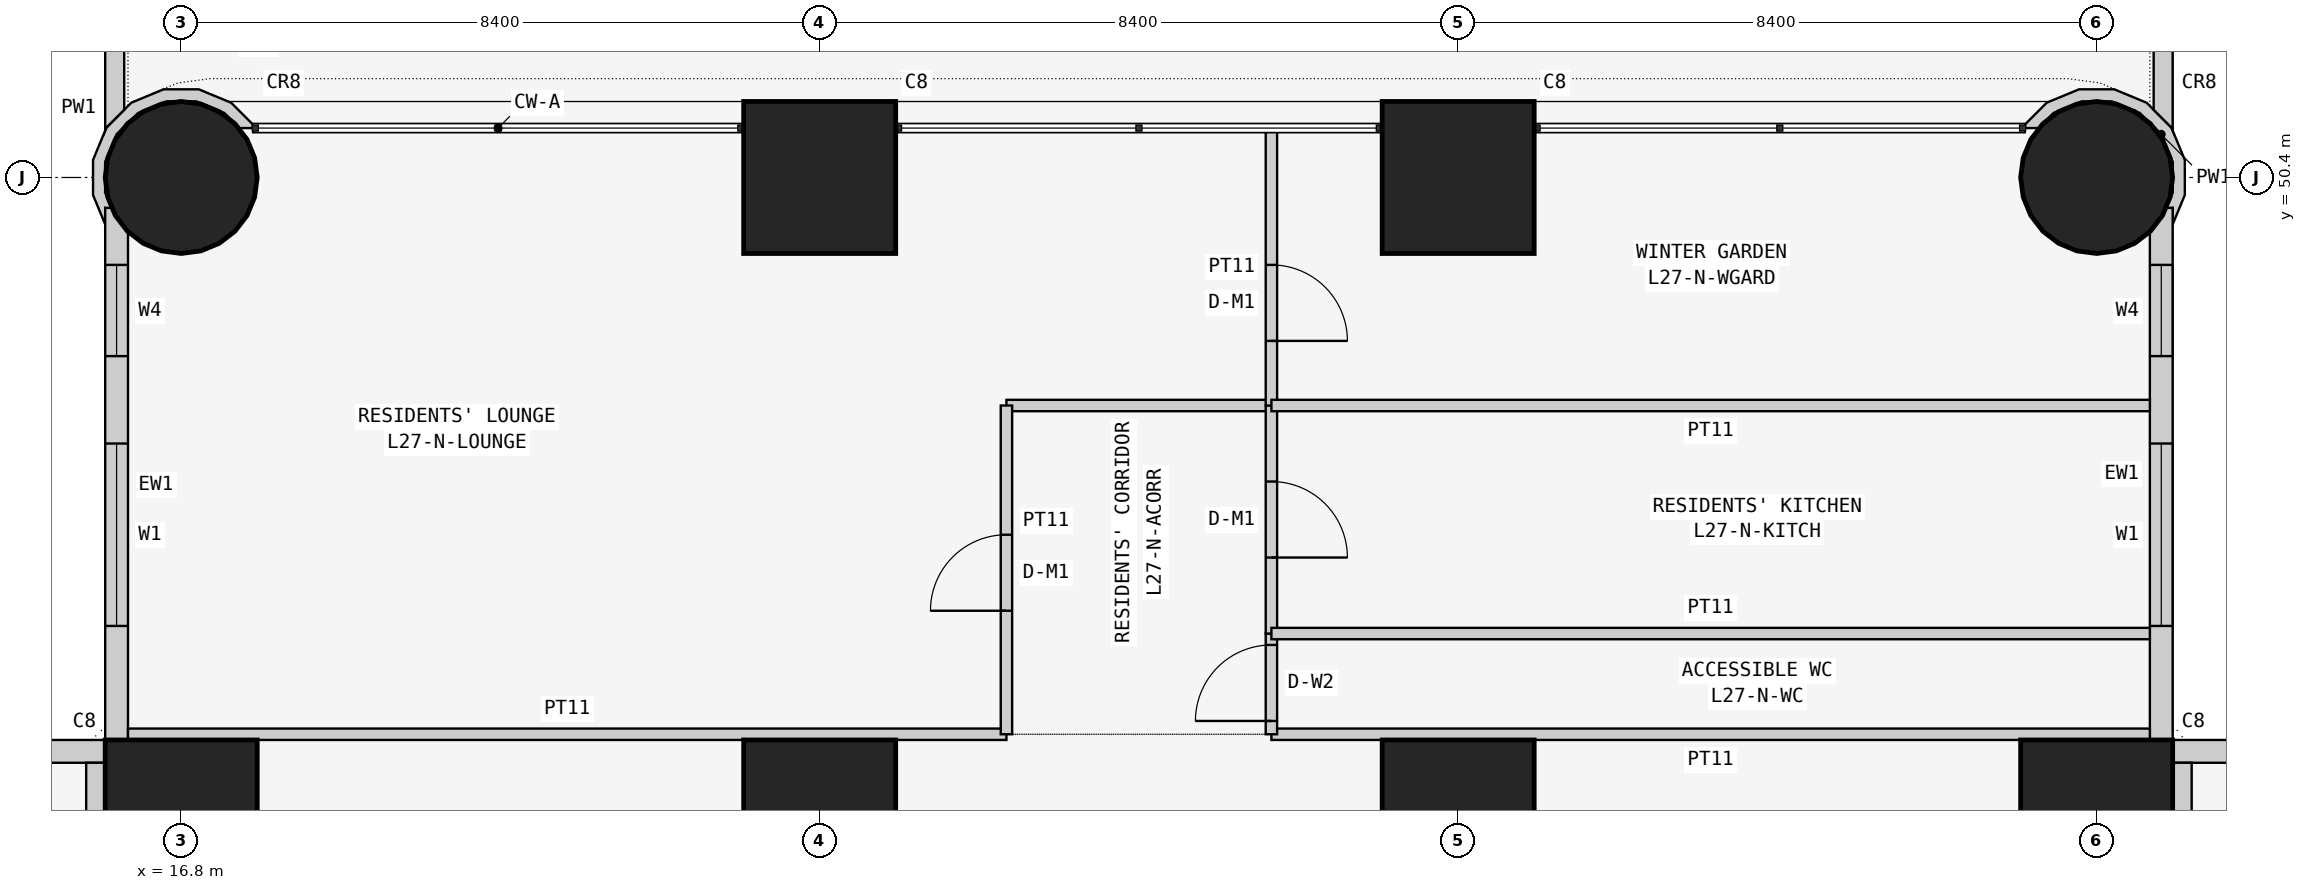
"""IFC4 building model, lengths in metres.
Left out: names, types, materials, properties, quantities, classifications, styles, units other than length and angle.
Written with IfcOpenShell. Run it as: python <this file> out.ifc"""

import sys

from ifc_helpers import new_model, si_unit, direction, frame, frame_2d, origin, origin_2d, place, context, subcontext, project, spatial, polyline, rectangle, circle, outline, extrude, element, fill, save


model = new_model("IFC4")
c1 = context("Model", 3, precision=1e-05, world=origin(), true_north=direction((0.0, 1.0)))
c2 = subcontext(c1, "Body", "Model", "MODEL_VIEW")
j1 = project(units=[si_unit("LENGTHUNIT", "METRE"), si_unit("PLANEANGLEUNIT", "RADIAN")], contexts=[c1])
p1 = place(None, origin())
s1 = spatial("IfcSite", under=j1, at=p1, CompositionType="ELEMENT")
p2 = place(p1, origin())
s2 = spatial("IfcBuilding", under=s1, at=p2, CompositionType="ELEMENT")
p3 = place(p2, frame((0.0, 0.0, 108.9)))
s3 = spatial("IfcBuildingStorey", under=s2, at=p3, CompositionType="ELEMENT", Elevation=108.9)
p4 = place(p3, frame((16.8, 42.0, 0.0), z_axis=(0.0, 0.0, 1.0), x_axis=(1.0, 0.0, 0.0)))
e1 = element("IfcColumn", 1, at=p4, inside=s3, PredefinedType="COLUMN", context=c2, shape_type="SweptSolid", body=[
    extrude(rectangle(XDim=2.0, YDim=2.0, at=origin_2d()), origin(), (0.0, 0.0, 1.0), 3.6),
])
p5 = place(p3, frame((16.8, 50.4, 0.0), z_axis=(0.0, 0.0, 1.0), x_axis=(1.0, 0.0, 0.0)))
e2 = element("IfcColumn", 2, at=p5, inside=s3, PredefinedType="COLUMN", context=c2, shape_type="SweptSolid", body=[
    extrude(circle(Radius=1.0, at=origin_2d()), origin(), (0.0, 0.0, 1.0), 3.6),
])
for number, where, z_axis, x_axis in (
    (3, (25.2, 42.0, 0.0), (0.0, 0.0, 1.0), (1.0, 0.0, 0.0)),
    (4, (25.2, 50.4, 0.0), (0.0, 0.0, 1.0), (1.0, 0.0, 0.0)),
    (5, (33.6, 42.0, 0.0), (0.0, 0.0, 1.0), (1.0, 0.0, 0.0)),
    (6, (33.6, 50.4, 0.0), (0.0, 0.0, 1.0), (1.0, 0.0, 0.0)),
    (7, (42.0, 42.0, 0.0), (0.0, 0.0, 1.0), (1.0, 0.0, 0.0)),
):
    element("IfcColumn", number, at=place(p3, frame(where, z_axis=z_axis, x_axis=x_axis)), inside=s3, PredefinedType="COLUMN", context=c2, shape_type="SweptSolid", body=[
        extrude(rectangle(XDim=2.0, YDim=2.0, at=origin_2d()), origin(), (0.0, 0.0, 1.0), 3.6),
    ])
p6 = place(p3, frame((42.0, 50.4, 0.0), z_axis=(0.0, 0.0, 1.0), x_axis=(1.0, 0.0, 0.0)))
e8 = element("IfcColumn", 8, at=p6, inside=s3, PredefinedType="COLUMN", context=c2, shape_type="SweptSolid", body=[
    extrude(circle(Radius=1.0, at=origin_2d()), origin(), (0.0, 0.0, 1.0), 3.6),
])
p7 = place(p3, frame((15.8, 42.85, 0.0), z_axis=(0.0, 0.0, 1.0), x_axis=(-1.0, 0.0, 0.0)))
e9 = element("IfcWall", 9, at=p7, inside=s3, PredefinedType="SOLIDWALL", context=c2, shape_type="SweptSolid", body=[
    extrude(rectangle(XDim=15.4, YDim=0.3, at=frame_2d((7.7, 0.0))), origin(), (0.0, 0.0, 1.0), 3.45),
])
p8 = place(p7, frame((1.2, 0.0, 0.9)))
e10 = element("IfcOpeningElement", 10, at=p8, cuts=e9, PredefinedType="OPENING", context=c2, shape_type="SweptSolid", body=[
    extrude(rectangle(XDim=1.8, YDim=1.5, at=frame_2d((0.9, 0.75))), frame((0.0, 0.16, 0.0), z_axis=(0.0, -1.0, 0.0), x_axis=(1.0, 0.0, 0.0)), (0.0, 0.0, 1.0), 0.32),
])
p9 = place(p7, frame((4.95, 0.0, 1.5)))
e11 = element("IfcOpeningElement", 11, at=p9, cuts=e9, PredefinedType="OPENING", context=c2, shape_type="SweptSolid", body=[
    extrude(rectangle(XDim=0.9, YDim=0.7, at=frame_2d((0.45, 0.35))), frame((0.0, 0.16, 0.0), z_axis=(0.0, -1.0, 0.0), x_axis=(1.0, 0.0, 0.0)), (0.0, 0.0, 1.0), 0.32),
])
p10 = place(p7, frame((8.5, 0.0, 0.9)))
e12 = element("IfcOpeningElement", 12, at=p10, cuts=e9, PredefinedType="OPENING", context=c2, shape_type="SweptSolid", body=[
    extrude(rectangle(XDim=1.8, YDim=1.5, at=frame_2d((0.9, 0.75))), frame((0.0, 0.16, 0.0), z_axis=(0.0, -1.0, 0.0), x_axis=(1.0, 0.0, 0.0)), (0.0, 0.0, 1.0), 0.32),
])
p11 = place(p7, frame((12.5, 0.0, 0.0)))
e13 = element("IfcOpeningElement", 13, at=p11, cuts=e9, PredefinedType="OPENING", context=c2, shape_type="SweptSolid", body=[
    extrude(rectangle(XDim=0.9, YDim=2.4, at=frame_2d((0.45, 1.2))), frame((0.0, 0.16, 0.0), z_axis=(0.0, -1.0, 0.0), x_axis=(1.0, 0.0, 0.0)), (0.0, 0.0, 1.0), 0.32),
])
p12 = place(p7, frame((13.5, 0.0, 0.9)))
e14 = element("IfcOpeningElement", 14, at=p12, cuts=e9, PredefinedType="OPENING", context=c2, shape_type="SweptSolid", body=[
    extrude(rectangle(XDim=1.2, YDim=1.5, at=frame_2d((0.6, 0.75))), frame((0.0, 0.16, 0.0), z_axis=(0.0, -1.0, 0.0), x_axis=(1.0, 0.0, 0.0)), (0.0, 0.0, 1.0), 0.32),
])
p13 = place(p3, frame((58.4, 42.85, 0.0), z_axis=(0.0, 0.0, 1.0), x_axis=(-1.0, 0.0, 0.0)))
e15 = element("IfcWall", 15, at=p13, inside=s3, PredefinedType="SOLIDWALL", context=c2, shape_type="SweptSolid", body=[
    extrude(rectangle(XDim=15.7, YDim=0.3, at=frame_2d((7.85, 0.0))), origin(), (0.0, 0.0, 1.0), 3.45),
])
p14 = place(p13, frame((12.4, 0.0, 0.9)))
e16 = element("IfcOpeningElement", 16, at=p14, cuts=e15, PredefinedType="OPENING", context=c2, shape_type="SweptSolid", body=[
    extrude(rectangle(XDim=1.8, YDim=1.5, at=frame_2d((0.9, 0.75))), frame((0.0, 0.16, 0.0), z_axis=(0.0, -1.0, 0.0), x_axis=(1.0, 0.0, 0.0)), (0.0, 0.0, 1.0), 0.32),
])
p15 = place(p13, frame((9.55, 0.0, 1.5)))
e17 = element("IfcOpeningElement", 17, at=p15, cuts=e15, PredefinedType="OPENING", context=c2, shape_type="SweptSolid", body=[
    extrude(rectangle(XDim=0.9, YDim=0.7, at=frame_2d((0.45, 0.35))), frame((0.0, 0.16, 0.0), z_axis=(0.0, -1.0, 0.0), x_axis=(1.0, 0.0, 0.0)), (0.0, 0.0, 1.0), 0.32),
])
p16 = place(p13, frame((5.1, 0.0, 0.9)))
e18 = element("IfcOpeningElement", 18, at=p16, cuts=e15, PredefinedType="OPENING", context=c2, shape_type="SweptSolid", body=[
    extrude(rectangle(XDim=1.8, YDim=1.5, at=frame_2d((0.9, 0.75))), frame((0.0, 0.16, 0.0), z_axis=(0.0, -1.0, 0.0), x_axis=(1.0, 0.0, 0.0)), (0.0, 0.0, 1.0), 0.32),
])
p17 = place(p13, frame((2.0, 0.0, 0.0)))
e19 = element("IfcOpeningElement", 19, at=p17, cuts=e15, PredefinedType="OPENING", context=c2, shape_type="SweptSolid", body=[
    extrude(rectangle(XDim=0.9, YDim=2.4, at=frame_2d((0.45, 1.2))), frame((0.0, 0.16, 0.0), z_axis=(0.0, -1.0, 0.0), x_axis=(1.0, 0.0, 0.0)), (0.0, 0.0, 1.0), 0.32),
])
p18 = place(p13, frame((0.7, 0.0, 0.9)))
e20 = element("IfcOpeningElement", 20, at=p18, cuts=e15, PredefinedType="OPENING", context=c2, shape_type="SweptSolid", body=[
    extrude(rectangle(XDim=1.2, YDim=1.5, at=frame_2d((0.6, 0.75))), frame((0.0, 0.16, 0.0), z_axis=(0.0, -1.0, 0.0), x_axis=(1.0, 0.0, 0.0)), (0.0, 0.0, 1.0), 0.32),
])
p19 = place(p3, frame((42.85, 43.0, 0.0), z_axis=(0.0, 0.0, 1.0), x_axis=(0.0, 1.0, 0.0)))
e21 = element("IfcWall", 21, at=p19, inside=s3, PredefinedType="SOLIDWALL", context=c2, shape_type="SweptSolid", body=[
    extrude(rectangle(XDim=7.0, YDim=0.3, at=frame_2d((3.5, 0.0))), origin(), (0.0, 0.0, 1.0), 3.45),
])
p20 = place(p19, frame((1.5, 0.0, 0.9)))
e22 = element("IfcOpeningElement", 22, at=p20, cuts=e21, PredefinedType="OPENING", context=c2, shape_type="SweptSolid", body=[
    extrude(rectangle(XDim=2.4, YDim=1.5, at=frame_2d((1.2, 0.75))), frame((0.0, 0.16, 0.0), z_axis=(0.0, -1.0, 0.0), x_axis=(1.0, 0.0, 0.0)), (0.0, 0.0, 1.0), 0.32),
])
p21 = place(p19, frame((5.05, 0.0, 0.9)))
e23 = element("IfcOpeningElement", 23, at=p21, cuts=e21, PredefinedType="OPENING", context=c2, shape_type="SweptSolid", body=[
    extrude(rectangle(XDim=1.2, YDim=1.5, at=frame_2d((0.6, 0.75))), frame((0.0, 0.16, 0.0), z_axis=(0.0, -1.0, 0.0), x_axis=(1.0, 0.0, 0.0)), (0.0, 0.0, 1.0), 0.32),
])
p22 = place(p3, frame((15.95, 50.0, 0.0), z_axis=(0.0, 0.0, 1.0), x_axis=(0.0, -1.0, 0.0)))
e24 = element("IfcWall", 24, at=p22, inside=s3, PredefinedType="SOLIDWALL", context=c2, shape_type="SweptSolid", body=[
    extrude(rectangle(XDim=7.3, YDim=0.3, at=frame_2d((3.65, 0.0))), origin(), (0.0, 0.0, 1.0), 3.45),
])
p23 = place(p22, frame((3.1, 0.0, 0.9)))
e25 = element("IfcOpeningElement", 25, at=p23, cuts=e24, PredefinedType="OPENING", context=c2, shape_type="SweptSolid", body=[
    extrude(rectangle(XDim=2.4, YDim=1.5, at=frame_2d((1.2, 0.75))), frame((0.0, 0.16, 0.0), z_axis=(0.0, -1.0, 0.0), x_axis=(1.0, 0.0, 0.0)), (0.0, 0.0, 1.0), 0.32),
])
p24 = place(p22, frame((0.75, 0.0, 0.9)))
e26 = element("IfcOpeningElement", 26, at=p24, cuts=e24, PredefinedType="OPENING", context=c2, shape_type="SweptSolid", body=[
    extrude(rectangle(XDim=1.2, YDim=1.5, at=frame_2d((0.6, 0.75))), frame((0.0, 0.16, 0.0), z_axis=(0.0, -1.0, 0.0), x_axis=(1.0, 0.0, 0.0)), (0.0, 0.0, 1.0), 0.32),
])
p25 = place(p3, frame((42.919, 49.833, 0.0), z_axis=(0.0, 0.0, 1.0), x_axis=(0.555974394895, 0.831199417842, 0.0)))
e27 = element("IfcWall", 27, at=p25, inside=s3, PredefinedType="SOLIDWALL", context=c2, shape_type="SweptSolid", body=[
    extrude(outline(polyline([(0.413, -0.013), (0.797, 0.243), (1.053, 0.627), (1.143, 1.08), (1.053, 1.532), (0.796, 1.916), (0.412, 2.172), (0.017, 2.25), (-0.023, 2.224), (0.075, 2.077), (0.35, 2.022), (0.682, 1.801), (0.903, 1.47), (0.981, 1.08), (0.904, 0.689), (0.682, 0.358), (0.351, 0.137), (0.126, 0.092), (0.184, 0.026), (0.003, -0.095), (0.413, -0.013)])), origin(), (0.0, 0.0, 1.0), 3.45),
])
p26 = place(p3, frame((17.668, 51.043, 0.0), z_axis=(0.0, 0.0, 1.0), x_axis=(-0.555974394895, 0.831199417842, 0.0)))
e28 = element("IfcWall", 28, at=p26, inside=s3, PredefinedType="SOLIDWALL", context=c2, shape_type="SweptSolid", body=[
    extrude(outline(polyline([(0.004, -0.092), (0.4, -0.014), (0.784, 0.242), (1.04, 0.625), (1.13, 1.078), (1.041, 1.531), (0.784, 1.915), (0.401, 2.171), (-0.009, 2.253), (0.171, 2.132), (0.113, 2.066), (0.339, 2.021), (0.67, 1.8), (0.891, 1.469), (0.968, 1.078), (0.89, 0.688), (0.669, 0.357), (0.338, 0.136), (0.062, 0.081), (-0.036, -0.066), (0.004, -0.092)])), origin(), (0.0, 0.0, 1.0), 3.45),
])
p27 = place(p3, origin())
e29 = element("IfcWall", 29, at=p27, inside=s3, PredefinedType="PARAPET", context=c2, shape_type="SweptSolid", body=[
    extrude(outline(polyline([(15.988, 59.1), (16.21, 59.39), (16.5, 59.612), (16.838, 59.752), (17.2, 59.8), (41.6, 59.8), (41.962, 59.752), (42.3, 59.612), (42.59, 59.39), (42.812, 59.1), (42.952, 58.762), (43.0, 58.4), (43.0, 51.017), (42.983, 51.057), (42.75, 51.291), (42.75, 58.384), (42.709, 58.697), (42.594, 58.974), (42.412, 59.212), (42.174, 59.394), (41.897, 59.509), (41.583, 59.55), (17.216, 59.55), (16.903, 59.509), (16.626, 59.394), (16.388, 59.212), (16.206, 58.974), (16.091, 58.697), (16.05, 58.384), (16.05, 51.291), (15.817, 51.057), (15.8, 51.017), (15.8, 58.4), (15.848, 58.762), (15.988, 59.1)])), origin(), (0.0, 0.0, 1.0), 1.25),
])
p28 = place(p3, origin())
e30 = element("IfcWall", 30, at=p28, inside=s3, PredefinedType="PARAPET", context=c2, shape_type="SweptSolid", body=[
    extrude(outline(polyline([(42.812, 50.7), (42.74, 50.794), (42.74, 51.076), (42.849, 50.967), (43.0, 50.602), (43.0, 50.377), (42.946, 50.377), (42.812, 50.7)])), origin(), (0.0, 0.0, 1.0), 1.25),
])
p29 = place(p3, origin())
e31 = element("IfcWall", 31, at=p29, inside=s3, PredefinedType="PARAPET", context=c2, shape_type="SweptSolid", body=[
    extrude(outline(polyline([(15.988, 50.7), (15.854, 50.377), (15.8, 50.377), (15.8, 50.602), (15.951, 50.967), (16.06, 51.076), (16.06, 50.794), (15.988, 50.7)])), origin(), (0.0, 0.0, 1.0), 1.25),
])
for number, where, z_axis, x_axis in (
    (32, (16.1, 43.075, 0.0), (0.0, 0.0, 1.0), (1.0, 0.0, 0.0)),
    (33, (31.143, 43.075, 0.0), (0.0, 0.0, 1.0), (1.0, 0.0, 0.0)),
):
    element("IfcWall", number, at=place(p3, frame(where, z_axis=z_axis, x_axis=x_axis)), inside=s3, PredefinedType="PARTITIONING", context=c2, shape_type="SweptSolid", body=[
        extrude(rectangle(XDim=11.557, YDim=0.15, at=frame_2d((5.778, 0.0))), origin(), (0.0, 0.0, 1.0), 3.45),
    ])
for number, where, z_axis, x_axis in (
    (34, (43.125, 42.7, 0.0), (0.0, 0.0, 1.0), (0.0, -1.0, 0.0)),
    (35, (15.675, 35.829, 0.0), (0.0, 0.0, 1.0), (0.0, 1.0, 0.0)),
):
    element("IfcWall", number, at=place(p3, frame(where, z_axis=z_axis, x_axis=x_axis)), inside=s3, PredefinedType="PARTITIONING", context=c2, shape_type="SweptSolid", body=[
        extrude(rectangle(XDim=6.871, YDim=0.25, at=frame_2d((3.436, 0.0))), origin(), (0.0, 0.0, 1.0), 3.45),
    ])
p30 = place(p3, frame((31.143, 47.4, 0.0), z_axis=(0.0, 0.0, 1.0), x_axis=(-1.0, 0.0, 0.0)))
e36 = element("IfcWall", 36, at=p30, inside=s3, PredefinedType="PARTITIONING", context=c2, shape_type="SweptSolid", body=[
    extrude(rectangle(XDim=3.486, YDim=0.15, at=frame_2d((1.743, 0.0))), origin(), (0.0, 0.0, 1.0), 3.45),
])
p31 = place(p3, frame((27.657, 47.4, 0.0), z_axis=(0.0, 0.0, 1.0), x_axis=(0.0, -1.0, 0.0)))
e37 = element("IfcWall", 37, at=p31, inside=s3, PredefinedType="PARTITIONING", context=c2, shape_type="SweptSolid", body=[
    extrude(rectangle(XDim=4.325, YDim=0.15, at=frame_2d((2.163, 0.0))), origin(), (0.0, 0.0, 1.0), 3.45),
])
p32 = place(p31, frame((1.7, 0.0, 0.0)))
e38 = element("IfcOpeningElement", 38, at=p32, cuts=e37, PredefinedType="OPENING", context=c2, shape_type="SweptSolid", body=[
    extrude(rectangle(XDim=1.0, YDim=2.1, at=frame_2d((0.5, 1.05))), frame((0.0, 0.085, 0.0), z_axis=(0.0, -1.0, 0.0), x_axis=(1.0, 0.0, 0.0)), (0.0, 0.0, 1.0), 0.17),
])
p33 = place(p3, frame((31.143, 43.075, 0.0), z_axis=(0.0, 0.0, 1.0), x_axis=(0.0, 1.0, 0.0)))
e39 = element("IfcWall", 39, at=p33, inside=s3, PredefinedType="PARTITIONING", context=c2, shape_type="SweptSolid", body=[
    extrude(rectangle(XDim=1.325, YDim=0.15, at=frame_2d((0.663, 0.0))), origin(), (0.0, 0.0, 1.0), 3.45),
])
p34 = place(p33, frame((0.175, 0.0, 0.0)))
e40 = element("IfcOpeningElement", 40, at=p34, cuts=e39, PredefinedType="OPENING", context=c2, shape_type="SweptSolid", body=[
    extrude(rectangle(XDim=1.0, YDim=2.1, at=frame_2d((0.5, 1.05))), frame((0.0, 0.085, 0.0), z_axis=(0.0, -1.0, 0.0), x_axis=(1.0, 0.0, 0.0)), (0.0, 0.0, 1.0), 0.17),
])
p35 = place(p3, frame((31.143, 44.4, 0.0), z_axis=(0.0, 0.0, 1.0), x_axis=(0.0, 1.0, 0.0)))
e41 = element("IfcWall", 41, at=p35, inside=s3, PredefinedType="PARTITIONING", context=c2, shape_type="SweptSolid", body=[
    extrude(rectangle(XDim=3.0, YDim=0.15, at=frame_2d((1.5, 0.0))), origin(), (0.0, 0.0, 1.0), 3.45),
])
p36 = place(p35, frame((1.0, 0.0, 0.0)))
e42 = element("IfcOpeningElement", 42, at=p36, cuts=e41, PredefinedType="OPENING", context=c2, shape_type="SweptSolid", body=[
    extrude(rectangle(XDim=1.0, YDim=2.1, at=frame_2d((0.5, 1.05))), frame((0.0, 0.085, 0.0), z_axis=(0.0, -1.0, 0.0), x_axis=(1.0, 0.0, 0.0)), (0.0, 0.0, 1.0), 0.17),
])
p37 = place(p3, frame((31.143, 51.05, 0.0), z_axis=(0.0, 0.0, 1.0), x_axis=(0.0, -1.0, 0.0)))
e43 = element("IfcWall", 43, at=p37, inside=s3, PredefinedType="PARTITIONING", context=c2, shape_type="SweptSolid", body=[
    extrude(rectangle(XDim=3.65, YDim=0.15, at=frame_2d((1.825, 0.0))), origin(), (0.0, 0.0, 1.0), 3.45),
])
p38 = place(p37, frame((1.8, 0.0, 0.0)))
e44 = element("IfcOpeningElement", 44, at=p38, cuts=e43, PredefinedType="OPENING", context=c2, shape_type="SweptSolid", body=[
    extrude(rectangle(XDim=1.0, YDim=2.1, at=frame_2d((0.5, 1.05))), frame((0.0, 0.085, 0.0), z_axis=(0.0, -1.0, 0.0), x_axis=(1.0, 0.0, 0.0)), (0.0, 0.0, 1.0), 0.17),
])
for number, where, z_axis, x_axis in (
    (45, (42.7, 44.4, 0.0), (0.0, 0.0, 1.0), (-1.0, 0.0, 0.0)),
    (46, (42.7, 47.4, 0.0), (0.0, 0.0, 1.0), (-1.0, 0.0, 0.0)),
):
    element("IfcWall", number, at=place(p3, frame(where, z_axis=z_axis, x_axis=x_axis)), inside=s3, PredefinedType="PARTITIONING", context=c2, shape_type="SweptSolid", body=[
        extrude(rectangle(XDim=11.557, YDim=0.15, at=frame_2d((5.778, 0.0))), origin(), (0.0, 0.0, 1.0), 3.45),
    ])
p39 = place(p23, origin())
e47 = element("IfcWindow", 47, at=p39, inside=s3, PartitioningType="SINGLE_PANEL", PredefinedType="WINDOW", context=c2, shape_type="SweptSolid", body=[
    extrude(rectangle(XDim=2.4, YDim=1.5, at=frame_2d((1.2, 0.75))), frame((0.0, 0.03, 0.0), z_axis=(0.0, -1.0, 0.0), x_axis=(1.0, 0.0, 0.0)), (0.0, 0.0, 1.0), 0.06),
])
fill(e25, e47)
p40 = place(p24, origin())
e48 = element("IfcWindow", 48, at=p40, inside=s3, PartitioningType="SINGLE_PANEL", PredefinedType="WINDOW", context=c2, shape_type="SweptSolid", body=[
    extrude(rectangle(XDim=1.2, YDim=1.5, at=frame_2d((0.6, 0.75))), frame((0.0, 0.03, 0.0), z_axis=(0.0, -1.0, 0.0), x_axis=(1.0, 0.0, 0.0)), (0.0, 0.0, 1.0), 0.06),
])
fill(e26, e48)
p41 = place(p20, origin())
e49 = element("IfcWindow", 49, at=p41, inside=s3, PartitioningType="SINGLE_PANEL", PredefinedType="WINDOW", context=c2, shape_type="SweptSolid", body=[
    extrude(rectangle(XDim=2.4, YDim=1.5, at=frame_2d((1.2, 0.75))), frame((0.0, 0.03, 0.0), z_axis=(0.0, -1.0, 0.0), x_axis=(1.0, 0.0, 0.0)), (0.0, 0.0, 1.0), 0.06),
])
fill(e22, e49)
p42 = place(p21, origin())
e50 = element("IfcWindow", 50, at=p42, inside=s3, PartitioningType="SINGLE_PANEL", PredefinedType="WINDOW", context=c2, shape_type="SweptSolid", body=[
    extrude(rectangle(XDim=1.2, YDim=1.5, at=frame_2d((0.6, 0.75))), frame((0.0, 0.03, 0.0), z_axis=(0.0, -1.0, 0.0), x_axis=(1.0, 0.0, 0.0)), (0.0, 0.0, 1.0), 0.06),
])
fill(e23, e50)
p43 = place(p32, frame((1.0, 0.0, 0.0), z_axis=(0.0, 0.0, 1.0), x_axis=(-1.0, 0.0, 0.0)))
e51 = element("IfcDoor", 51, at=p43, inside=s3, OperationType="SINGLE_SWING_LEFT", PredefinedType="DOOR", context=c2, shape_type="SweptSolid", body=[
    extrude(rectangle(XDim=1.0, YDim=2.1, at=frame_2d((0.5, 1.05))), frame((0.0, 0.025, 0.0), z_axis=(0.0, -1.0, 0.0), x_axis=(1.0, 0.0, 0.0)), (0.0, 0.0, 1.0), 0.05),
])
fill(e38, e51)
p44 = place(p34, origin())
e52 = element("IfcDoor", 52, at=p44, inside=s3, OperationType="SINGLE_SWING_LEFT", PredefinedType="DOOR", context=c2, shape_type="SweptSolid", body=[
    extrude(rectangle(XDim=1.0, YDim=2.1, at=frame_2d((0.5, 1.05))), frame((0.0, 0.025, 0.0), z_axis=(0.0, -1.0, 0.0), x_axis=(1.0, 0.0, 0.0)), (0.0, 0.0, 1.0), 0.05),
])
fill(e40, e52)
p45 = place(p36, frame((1.0, 0.0, 0.0), z_axis=(0.0, 0.0, 1.0), x_axis=(-1.0, 0.0, 0.0)))
e53 = element("IfcDoor", 53, at=p45, inside=s3, OperationType="SINGLE_SWING_RIGHT", PredefinedType="DOOR", context=c2, shape_type="SweptSolid", body=[
    extrude(rectangle(XDim=1.0, YDim=2.1, at=frame_2d((0.5, 1.05))), frame((0.0, 0.025, 0.0), z_axis=(0.0, -1.0, 0.0), x_axis=(1.0, 0.0, 0.0)), (0.0, 0.0, 1.0), 0.05),
])
fill(e42, e53)
p46 = place(p38, origin())
e54 = element("IfcDoor", 54, at=p46, inside=s3, OperationType="SINGLE_SWING_RIGHT", PredefinedType="DOOR", context=c2, shape_type="SweptSolid", body=[
    extrude(rectangle(XDim=1.0, YDim=2.1, at=frame_2d((0.5, 1.05))), frame((0.0, 0.025, 0.0), z_axis=(0.0, -1.0, 0.0), x_axis=(1.0, 0.0, 0.0)), (0.0, 0.0, 1.0), 0.05),
])
fill(e44, e54)
save(model, sys.argv[1])
